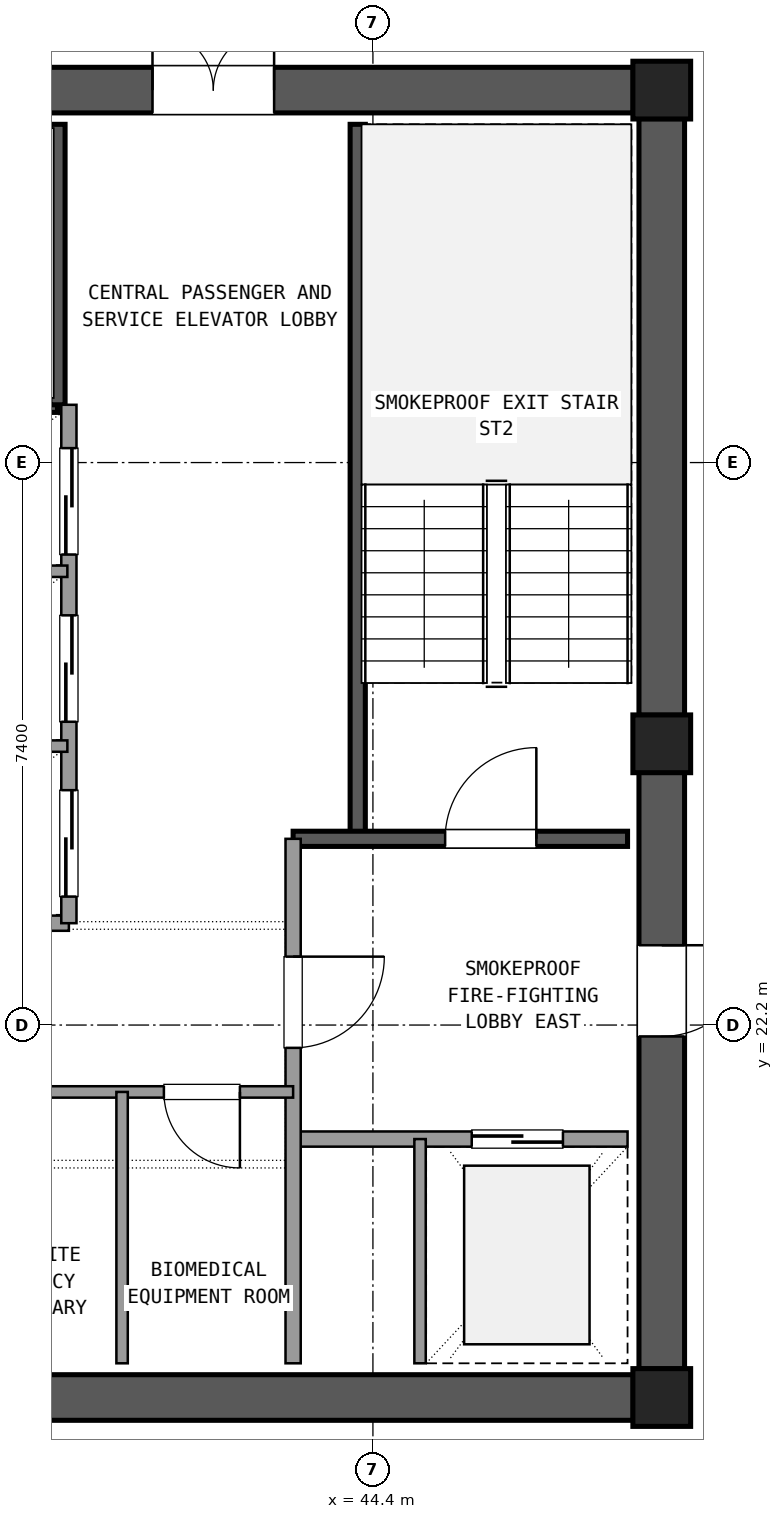
"""IFC4 building model, lengths in metres.
Left out: names, types, materials, properties, quantities, classifications, styles, units other than length and angle.
Written with IfcOpenShell. Run it as: python <this file> out.ifc"""

import sys

from ifc_helpers import new_model, si_unit, direction, frame, frame_2d, origin, origin_2d, place, context, subcontext, project, spatial, rectangle, extrude, element, fill, save


model = new_model("IFC4")
c1 = context("Model", 3, precision=1e-05, world=origin(), true_north=direction((0.0, 1.0)))
c2 = subcontext(c1, "Body", "Model", "MODEL_VIEW")
j1 = project(units=[si_unit("LENGTHUNIT", "METRE"), si_unit("PLANEANGLEUNIT", "RADIAN")], contexts=[c1])
p1 = place(None, origin())
s1 = spatial("IfcSite", under=j1, at=p1, CompositionType="ELEMENT")
p2 = place(p1, origin())
s2 = spatial("IfcBuilding", under=s1, at=p2, CompositionType="ELEMENT")
p3 = place(p2, frame((0.0, 0.0, 278.82)))
s3 = spatial("IfcBuildingStorey", under=s2, at=p3, CompositionType="ELEMENT", Elevation=278.82)
for number, where, z_axis, x_axis in (
    (1, (48.2, 17.3, 0.0), (0.0, 0.0, 1.0), (1.0, 0.0, 0.0)),
    (2, (48.2, 25.9, 0.0), (0.0, 0.0, 1.0), (1.0, 0.0, 0.0)),
    (3, (48.2, 34.5, 0.0), (0.0, 0.0, 1.0), (1.0, 0.0, 0.0)),
):
    element("IfcColumn", number, at=place(p3, frame(where, z_axis=z_axis, x_axis=x_axis)), inside=s3, PredefinedType="COLUMN", context=c2, shape_type="SweptSolid", body=[
        extrude(rectangle(XDim=0.76, YDim=0.76, at=origin_2d()), origin(), (0.0, 0.0, 1.0), 3.6),
    ])
p4 = place(p3, frame((37.375, 17.3, 0.0), z_axis=(0.0, 0.0, 1.0), x_axis=(1.0, 0.0, 0.0)))
e4 = element("IfcWall", 4, at=p4, inside=s3, PredefinedType="SHEAR", context=c2, shape_type="SweptSolid", body=[
    extrude(rectangle(XDim=10.45, YDim=0.6, at=frame_2d((5.225, 0.0))), origin(), (0.0, 0.0, 1.0), 3.32),
])
p5 = place(p3, frame((48.2, 17.675, 0.0), z_axis=(0.0, 0.0, 1.0), x_axis=(0.0, 1.0, 0.0)))
e5 = element("IfcWall", 5, at=p5, inside=s3, PredefinedType="SHEAR", context=c2, shape_type="SweptSolid", body=[
    extrude(rectangle(XDim=7.85, YDim=0.6, at=frame_2d((3.925, 0.0))), origin(), (0.0, 0.0, 1.0), 3.32),
])
p6 = place(p5, frame((4.375, 0.0, 0.0)))
e6 = element("IfcOpeningElement", 6, at=p6, cuts=e5, PredefinedType="OPENING", context=c2, shape_type="SweptSolid", body=[
    extrude(rectangle(XDim=1.2, YDim=2.15, at=frame_2d((0.6, 1.075))), frame((0.0, 0.31, 0.0), z_axis=(0.0, -1.0, 0.0), x_axis=(1.0, 0.0, 0.0)), (0.0, 0.0, 1.0), 0.62),
])
p7 = place(p3, frame((48.2, 26.275, 0.0), z_axis=(0.0, 0.0, 1.0), x_axis=(0.0, 1.0, 0.0)))
e7 = element("IfcWall", 7, at=p7, inside=s3, PredefinedType="SHEAR", context=c2, shape_type="SweptSolid", body=[
    extrude(rectangle(XDim=7.85, YDim=0.6, at=frame_2d((3.925, 0.0))), origin(), (0.0, 0.0, 1.0), 3.32),
])
p8 = place(p3, frame((47.825, 34.5, 0.0), z_axis=(0.0, 0.0, 1.0), x_axis=(-1.0, 0.0, 0.0)))
e8 = element("IfcWall", 8, at=p8, inside=s3, PredefinedType="SHEAR", context=c2, shape_type="SweptSolid", body=[
    extrude(rectangle(XDim=10.45, YDim=0.6, at=frame_2d((5.225, 0.0))), origin(), (0.0, 0.0, 1.0), 3.32),
])
p9 = place(p8, frame((4.725, 0.0, 0.0)))
e9 = element("IfcOpeningElement", 9, at=p9, cuts=e8, PredefinedType="OPENING", context=c2, shape_type="SweptSolid", body=[
    extrude(rectangle(XDim=1.6, YDim=2.2, at=frame_2d((0.8, 1.1))), frame((0.0, 0.31, 0.0), z_axis=(0.0, -1.0, 0.0), x_axis=(1.0, 0.0, 0.0)), (0.0, 0.0, 1.0), 0.62),
])
p10 = place(p3, frame((44.2, 24.65, 0.0), z_axis=(0.0, 0.0, 1.0), x_axis=(0.0, 1.0, 0.0)))
e10 = element("IfcWall", 10, at=p10, inside=s3, PredefinedType="SHEAR", context=c2, shape_type="SweptSolid", body=[
    extrude(rectangle(XDim=9.4, YDim=0.2, at=frame_2d((4.7, 0.0))), origin(), (0.0, 0.0, 1.0), 3.32),
])
p11 = place(p3, frame((43.35, 24.65, 0.0), z_axis=(0.0, 0.0, 1.0), x_axis=(1.0, 0.0, 0.0)))
e11 = element("IfcWall", 11, at=p11, inside=s3, PredefinedType="SHEAR", context=c2, shape_type="SweptSolid", body=[
    extrude(rectangle(XDim=4.4, YDim=0.2, at=frame_2d((2.2, 0.0))), origin(), (0.0, 0.0, 1.0), 3.32),
])
p12 = place(p11, frame((2.0, 0.0, 0.0)))
e12 = element("IfcOpeningElement", 12, at=p12, cuts=e11, PredefinedType="OPENING", context=c2, shape_type="SweptSolid", body=[
    extrude(rectangle(XDim=1.2, YDim=2.15, at=frame_2d((0.6, 1.075))), frame((0.0, 0.11, 0.0), z_axis=(0.0, -1.0, 0.0), x_axis=(1.0, 0.0, 0.0)), (0.0, 0.0, 1.0), 0.22),
])
p13 = place(p3, frame((30.75, 30.36, 0.0), z_axis=(0.0, 0.0, 1.0), x_axis=(1.0, 0.0, 0.0)))
e13 = element("IfcWall", 13, at=p13, inside=s3, PredefinedType="SHEAR", context=c2, shape_type="SweptSolid", body=[
    extrude(rectangle(XDim=9.5, YDim=0.2, at=frame_2d((4.75, 0.0))), origin(), (0.0, 0.0, 1.0), 3.32),
])
p14 = place(p3, frame((40.25, 30.36, 0.0), z_axis=(0.0, 0.0, 1.0), x_axis=(0.0, 1.0, 0.0)))
e14 = element("IfcWall", 14, at=p14, inside=s3, PredefinedType="SHEAR", context=c2, shape_type="SweptSolid", body=[
    extrude(rectangle(XDim=3.69, YDim=0.2, at=frame_2d((1.845, 0.0))), origin(), (0.0, 0.0, 1.0), 3.32),
])
p15 = place(p3, frame((43.35, 20.7, 0.0), z_axis=(0.0, 0.0, 1.0), x_axis=(1.0, 0.0, 0.0)))
e15 = element("IfcWall", 15, at=p15, inside=s3, PredefinedType="SOLIDWALL", context=c2, shape_type="SweptSolid", body=[
    extrude(rectangle(XDim=4.4, YDim=0.2, at=frame_2d((2.2, 0.0))), origin(), (0.0, 0.0, 1.0), 2.61),
])
p16 = place(p15, frame((2.35, 0.0, 0.0)))
e16 = element("IfcOpeningElement", 16, at=p16, cuts=e15, PredefinedType="OPENING", context=c2, shape_type="SweptSolid", body=[
    extrude(rectangle(XDim=1.2, YDim=2.15, at=frame_2d((0.6, 1.075))), frame((0.0, 0.11, 0.0), z_axis=(0.0, -1.0, 0.0), x_axis=(1.0, 0.0, 0.0)), (0.0, 0.0, 1.0), 0.22),
])
p17 = place(p3, frame((43.35, 17.75, 0.0), z_axis=(0.0, 0.0, 1.0), x_axis=(0.0, 1.0, 0.0)))
e17 = element("IfcWall", 17, at=p17, inside=s3, PredefinedType="SOLIDWALL", context=c2, shape_type="SweptSolid", body=[
    extrude(rectangle(XDim=6.9, YDim=0.2, at=frame_2d((3.45, 0.0))), origin(), (0.0, 0.0, 1.0), 2.61),
])
p18 = place(p17, frame((4.15, 0.0, 0.0)))
e18 = element("IfcOpeningElement", 18, at=p18, cuts=e17, PredefinedType="OPENING", context=c2, shape_type="SweptSolid", body=[
    extrude(rectangle(XDim=1.2, YDim=2.15, at=frame_2d((0.6, 1.075))), frame((0.0, 0.11, 0.0), z_axis=(0.0, -1.0, 0.0), x_axis=(1.0, 0.0, 0.0)), (0.0, 0.0, 1.0), 0.22),
])
p19 = place(p3, frame((45.02, 17.75, 0.0), z_axis=(0.0, 0.0, 1.0), x_axis=(0.0, 1.0, 0.0)))
e19 = element("IfcWall", 19, at=p19, inside=s3, PredefinedType="PARTITIONING", context=c2, shape_type="SweptSolid", body=[
    extrude(rectangle(XDim=2.95, YDim=0.15, at=frame_2d((1.475, 0.0))), origin(), (0.0, 0.0, 1.0), 2.61),
])
p20 = place(p3, frame((37.25, 21.32, 0.0), z_axis=(0.0, 0.0, 1.0), x_axis=(1.0, 0.0, 0.0)))
e20 = element("IfcWall", 20, at=p20, inside=s3, PredefinedType="PARTITIONING", context=c2, shape_type="SweptSolid", body=[
    extrude(rectangle(XDim=6.1, YDim=0.15, at=frame_2d((3.05, 0.0))), origin(), (0.0, 0.0, 1.0), 2.61),
])
p21 = place(p20, frame((0.55, 0.0, 0.0)))
e21 = element("IfcOpeningElement", 21, at=p21, cuts=e20, PredefinedType="OPENING", context=c2, shape_type="SweptSolid", body=[
    extrude(rectangle(XDim=1.0, YDim=2.15, at=frame_2d((0.5, 1.075))), frame((0.0, 0.085, 0.0), z_axis=(0.0, -1.0, 0.0), x_axis=(1.0, 0.0, 0.0)), (0.0, 0.0, 1.0), 0.17),
])
p22 = place(p20, frame((4.4, 0.0, 0.0)))
e22 = element("IfcOpeningElement", 22, at=p22, cuts=e20, PredefinedType="OPENING", context=c2, shape_type="SweptSolid", body=[
    extrude(rectangle(XDim=1.0, YDim=2.15, at=frame_2d((0.5, 1.075))), frame((0.0, 0.085, 0.0), z_axis=(0.0, -1.0, 0.0), x_axis=(1.0, 0.0, 0.0)), (0.0, 0.0, 1.0), 0.17),
])
p23 = place(p3, frame((41.1, 17.75, 0.0), z_axis=(0.0, 0.0, 1.0), x_axis=(0.0, 1.0, 0.0)))
e23 = element("IfcWall", 23, at=p23, inside=s3, PredefinedType="PARTITIONING", context=c2, shape_type="SweptSolid", body=[
    extrude(rectangle(XDim=3.57, YDim=0.15, at=frame_2d((1.785, 0.0))), origin(), (0.0, 0.0, 1.0), 2.61),
])
p24 = place(p3, frame((37.35, 23.54, 0.0), z_axis=(0.0, 0.0, 1.0), x_axis=(1.0, 0.0, 0.0)))
e24 = element("IfcWall", 24, at=p24, inside=s3, PredefinedType="SOLIDWALL", context=c2, shape_type="SweptSolid", body=[
    extrude(rectangle(XDim=3.05, YDim=0.2, at=frame_2d((1.525, 0.0))), origin(), (0.0, 0.0, 1.0), 2.61),
])
p25 = place(p3, frame((40.4, 23.54, 0.0), z_axis=(0.0, 0.0, 1.0), x_axis=(0.0, 1.0, 0.0)))
e25 = element("IfcWall", 25, at=p25, inside=s3, PredefinedType="SOLIDWALL", context=c2, shape_type="SweptSolid", body=[
    extrude(rectangle(XDim=6.82, YDim=0.2, at=frame_2d((3.41, 0.0))), origin(), (0.0, 0.0, 1.0), 2.61),
])
p26 = place(p25, frame((0.35, 0.0, 0.0)))
e26 = element("IfcOpeningElement", 26, at=p26, cuts=e25, PredefinedType="OPENING", context=c2, shape_type="SweptSolid", body=[
    extrude(rectangle(XDim=1.4, YDim=2.2, at=frame_2d((0.7, 1.1))), frame((0.0, 0.11, 0.0), z_axis=(0.0, -1.0, 0.0), x_axis=(1.0, 0.0, 0.0)), (0.0, 0.0, 1.0), 0.22),
])
p27 = place(p25, frame((2.65, 0.0, 0.0)))
e27 = element("IfcOpeningElement", 27, at=p27, cuts=e25, PredefinedType="OPENING", context=c2, shape_type="SweptSolid", body=[
    extrude(rectangle(XDim=1.4, YDim=2.2, at=frame_2d((0.7, 1.1))), frame((0.0, 0.11, 0.0), z_axis=(0.0, -1.0, 0.0), x_axis=(1.0, 0.0, 0.0)), (0.0, 0.0, 1.0), 0.22),
])
p28 = place(p25, frame((4.85, 0.0, 0.0)))
e28 = element("IfcOpeningElement", 28, at=p28, cuts=e25, PredefinedType="OPENING", context=c2, shape_type="SweptSolid", body=[
    extrude(rectangle(XDim=1.4, YDim=2.2, at=frame_2d((0.7, 1.1))), frame((0.0, 0.11, 0.0), z_axis=(0.0, -1.0, 0.0), x_axis=(1.0, 0.0, 0.0)), (0.0, 0.0, 1.0), 0.22),
])
for number, where, z_axis, x_axis in (
    (29, (37.37, 25.87, 0.0), (0.0, 0.0, 1.0), (1.0, 0.0, 0.0)),
    (30, (37.37, 28.17, 0.0), (0.0, 0.0, 1.0), (1.0, 0.0, 0.0)),
):
    element("IfcWall", number, at=place(p3, frame(where, z_axis=z_axis, x_axis=x_axis)), inside=s3, PredefinedType="PARTITIONING", context=c2, shape_type="SweptSolid", body=[
        extrude(rectangle(XDim=3.01, YDim=0.15, at=frame_2d((1.505, 0.0))), origin(), (0.0, 0.0, 1.0), 2.61),
    ])
p29 = place(p12, origin())
e31 = element("IfcDoor", 31, at=p29, inside=s3, OperationType="SINGLE_SWING_RIGHT", PredefinedType="DOOR", context=c2, shape_type="SweptSolid", body=[
    extrude(rectangle(XDim=1.2, YDim=2.15, at=frame_2d((0.6, 1.075))), frame((0.0, 0.025, 0.0), z_axis=(0.0, -1.0, 0.0), x_axis=(1.0, 0.0, 0.0)), (0.0, 0.0, 1.0), 0.05),
])
fill(e12, e31)
p30 = place(p16, origin())
e32 = element("IfcDoor", 32, at=p30, inside=s3, OperationType="SLIDING_TO_RIGHT", PredefinedType="DOOR", context=c2, shape_type="SweptSolid", body=[
    extrude(rectangle(XDim=1.2, YDim=2.15, at=frame_2d((0.6, 1.075))), frame((0.0, 0.025, 0.0), z_axis=(0.0, -1.0, 0.0), x_axis=(1.0, 0.0, 0.0)), (0.0, 0.0, 1.0), 0.05),
])
fill(e16, e32)
p31 = place(p18, frame((1.2, 0.0, 0.0), z_axis=(0.0, 0.0, 1.0), x_axis=(-1.0, 0.0, 0.0)))
e33 = element("IfcDoor", 33, at=p31, inside=s3, OperationType="SINGLE_SWING_RIGHT", PredefinedType="DOOR", context=c2, shape_type="SweptSolid", body=[
    extrude(rectangle(XDim=1.2, YDim=2.15, at=frame_2d((0.6, 1.075))), frame((0.0, 0.025, 0.0), z_axis=(0.0, -1.0, 0.0), x_axis=(1.0, 0.0, 0.0)), (0.0, 0.0, 1.0), 0.05),
])
fill(e18, e33)
p32 = place(p6, frame((1.2, 0.0, 0.0), z_axis=(0.0, 0.0, 1.0), x_axis=(-1.0, 0.0, 0.0)))
e34 = element("IfcDoor", 34, at=p32, inside=s3, OperationType="SINGLE_SWING_RIGHT", PredefinedType="DOOR", context=c2, shape_type="SweptSolid", body=[
    extrude(rectangle(XDim=1.2, YDim=2.15, at=frame_2d((0.6, 1.075))), frame((0.0, 0.025, 0.0), z_axis=(0.0, -1.0, 0.0), x_axis=(1.0, 0.0, 0.0)), (0.0, 0.0, 1.0), 0.05),
])
fill(e6, e34)
p33 = place(p9, frame((1.6, 0.0, 0.0), z_axis=(0.0, 0.0, 1.0), x_axis=(-1.0, 0.0, 0.0)))
e35 = element("IfcDoor", 35, at=p33, inside=s3, OperationType="DOUBLE_DOOR_SINGLE_SWING", PredefinedType="DOOR", context=c2, shape_type="SweptSolid", body=[
    extrude(rectangle(XDim=1.6, YDim=2.2, at=frame_2d((0.8, 1.1))), frame((0.0, 0.025, 0.0), z_axis=(0.0, -1.0, 0.0), x_axis=(1.0, 0.0, 0.0)), (0.0, 0.0, 1.0), 0.05),
])
fill(e9, e35)
p34 = place(p22, frame((1.0, 0.0, 0.0), z_axis=(0.0, 0.0, 1.0), x_axis=(-1.0, 0.0, 0.0)))
e36 = element("IfcDoor", 36, at=p34, inside=s3, OperationType="SINGLE_SWING_RIGHT", PredefinedType="DOOR", context=c2, shape_type="SweptSolid", body=[
    extrude(rectangle(XDim=1.0, YDim=2.15, at=frame_2d((0.5, 1.075))), frame((0.0, 0.025, 0.0), z_axis=(0.0, -1.0, 0.0), x_axis=(1.0, 0.0, 0.0)), (0.0, 0.0, 1.0), 0.05),
])
fill(e22, e36)
p35 = place(p26, origin())
e37 = element("IfcDoor", 37, at=p35, inside=s3, OperationType="SLIDING_TO_LEFT", PredefinedType="DOOR", context=c2, shape_type="SweptSolid", body=[
    extrude(rectangle(XDim=1.4, YDim=2.2, at=frame_2d((0.7, 1.1))), frame((0.0, 0.025, 0.0), z_axis=(0.0, -1.0, 0.0), x_axis=(1.0, 0.0, 0.0)), (0.0, 0.0, 1.0), 0.05),
])
fill(e26, e37)
p36 = place(p27, origin())
e38 = element("IfcDoor", 38, at=p36, inside=s3, OperationType="SLIDING_TO_LEFT", PredefinedType="DOOR", context=c2, shape_type="SweptSolid", body=[
    extrude(rectangle(XDim=1.4, YDim=2.2, at=frame_2d((0.7, 1.1))), frame((0.0, 0.025, 0.0), z_axis=(0.0, -1.0, 0.0), x_axis=(1.0, 0.0, 0.0)), (0.0, 0.0, 1.0), 0.05),
])
fill(e27, e38)
p37 = place(p28, origin())
e39 = element("IfcDoor", 39, at=p37, inside=s3, OperationType="SLIDING_TO_RIGHT", PredefinedType="DOOR", context=c2, shape_type="SweptSolid", body=[
    extrude(rectangle(XDim=1.4, YDim=2.2, at=frame_2d((0.7, 1.1))), frame((0.0, 0.025, 0.0), z_axis=(0.0, -1.0, 0.0), x_axis=(1.0, 0.0, 0.0)), (0.0, 0.0, 1.0), 0.05),
])
fill(e28, e39)
save(model, sys.argv[1])
